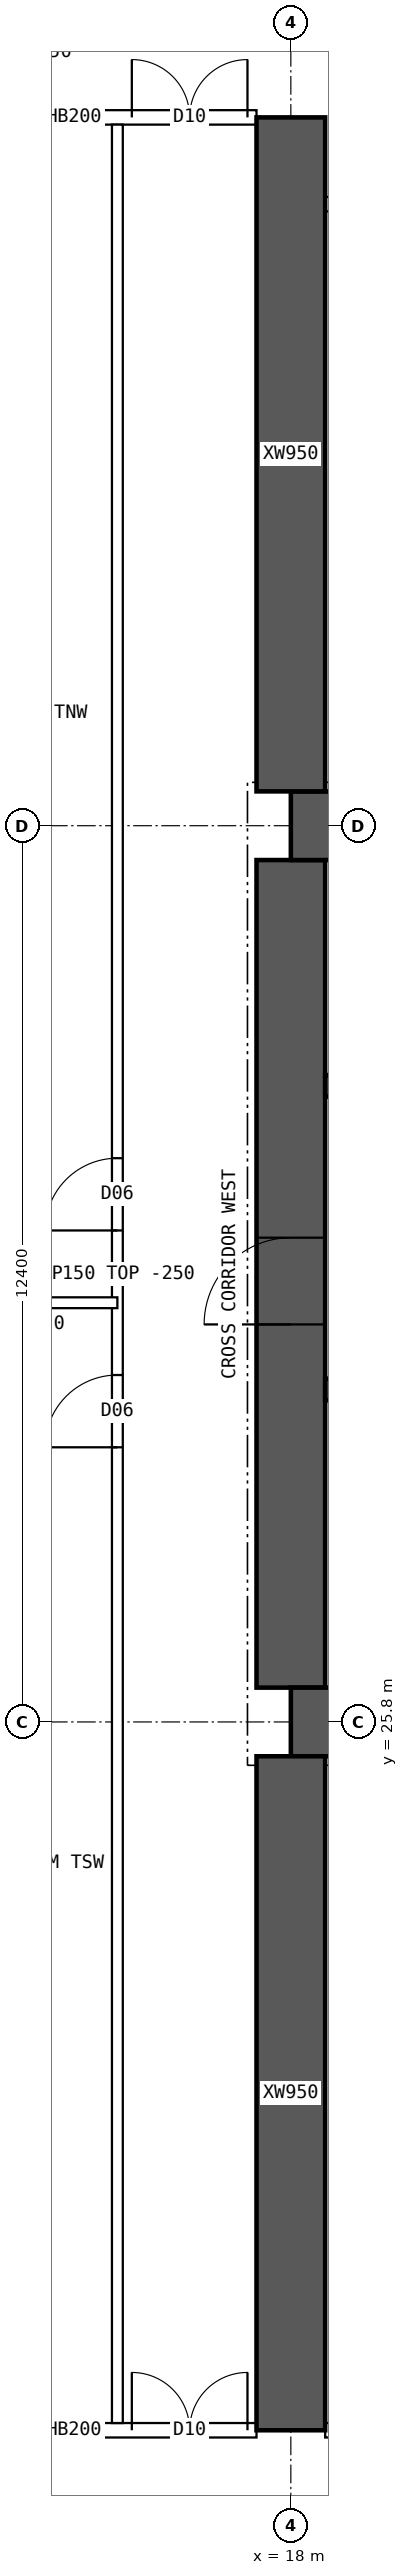
"""IFC4 building model, lengths in metres.
Left out: names, types, materials, properties, quantities, classifications, styles, units other than length and angle.
Written with IfcOpenShell. Run it as: python <this file> out.ifc"""

import sys

from ifc_helpers import new_model, si_unit, direction, frame, frame_2d, origin, place, context, subcontext, project, spatial, rectangle, extrude, element, fill, save


model = new_model("IFC4")
c1 = context("Model", 3, precision=1e-05, world=origin(), true_north=direction((0.0, 1.0)))
c2 = subcontext(c1, "Body", "Model", "MODEL_VIEW")
j1 = project(units=[si_unit("LENGTHUNIT", "METRE"), si_unit("PLANEANGLEUNIT", "RADIAN")], contexts=[c1])
p1 = place(None, origin())
s1 = spatial("IfcSite", under=j1, at=p1, CompositionType="ELEMENT")
p2 = place(p1, origin())
s2 = spatial("IfcBuilding", under=s1, at=p2, CompositionType="ELEMENT")
p3 = place(p2, frame((0.0, 0.0, 125.65)))
s3 = spatial("IfcBuildingStorey", under=s2, at=p3, CompositionType="ELEMENT", Elevation=125.65)
for number, where, z_axis, x_axis in (
    (1, (18.0, 25.8, 0.0), (0.0, 0.0, 1.0), (1.0, 0.0, 0.0)),
    (2, (18.0, 38.2, 0.0), (0.0, 0.0, 1.0), (1.0, 0.0, 0.0)),
):
    element("IfcWall", number, at=place(p3, frame(where, z_axis=z_axis, x_axis=x_axis)), inside=s3, PredefinedType="SHEAR", context=c2, shape_type="SweptSolid", body=[
        extrude(rectangle(XDim=48.0, YDim=0.95, at=frame_2d((24.0, 0.0))), origin(), (0.0, 0.0, 1.0), 3.75),
    ])
p4 = place(p3, frame((18.0, 26.275, 0.0), z_axis=(0.0, 0.0, 1.0), x_axis=(0.0, 1.0, 0.0)))
e3 = element("IfcWall", 3, at=p4, inside=s3, PredefinedType="SHEAR", context=c2, shape_type="SweptSolid", body=[
    extrude(rectangle(XDim=11.45, YDim=0.95, at=frame_2d((5.725, 0.0))), origin(), (0.0, 0.0, 1.0), 3.75),
])
p5 = place(p4, frame((5.025, 0.0, 0.0)))
e4 = element("IfcOpeningElement", 4, at=p5, cuts=e3, PredefinedType="OPENING", context=c2, shape_type="SweptSolid", body=[
    extrude(rectangle(XDim=1.2, YDim=2.1, at=frame_2d((0.6, 1.05))), frame((0.0, 0.485, 0.0), z_axis=(0.0, -1.0, 0.0), x_axis=(1.0, 0.0, 0.0)), (0.0, 0.0, 1.0), 0.97),
])
p6 = place(p3, frame((18.475, 30.4, 0.0), z_axis=(0.0, 0.0, 1.0), x_axis=(1.0, 0.0, 0.0)))
e5 = element("IfcWall", 5, at=p6, inside=s3, PredefinedType="SHEAR", context=c2, shape_type="SweptSolid", body=[
    extrude(rectangle(XDim=47.05, YDim=0.3, at=frame_2d((23.525, 0.0))), origin(), (0.0, 0.0, 1.0), 3.75),
])
p7 = place(p6, frame((0.4, 0.0, 0.0)))
e6 = element("IfcOpeningElement", 6, at=p7, cuts=e5, PredefinedType="OPENING", context=c2, shape_type="SweptSolid", body=[
    extrude(rectangle(XDim=1.0, YDim=2.1, at=frame_2d((0.5, 1.05))), frame((0.0, 0.16, 0.0), z_axis=(0.0, -1.0, 0.0), x_axis=(1.0, 0.0, 0.0)), (0.0, 0.0, 1.0), 0.32),
])
p8 = place(p6, frame((45.65, 0.0, 0.0)))
e7 = element("IfcOpeningElement", 7, at=p8, cuts=e5, PredefinedType="OPENING", context=c2, shape_type="SweptSolid", body=[
    extrude(rectangle(XDim=1.0, YDim=2.1, at=frame_2d((0.5, 1.05))), frame((0.0, 0.16, 0.0), z_axis=(0.0, -1.0, 0.0), x_axis=(1.0, 0.0, 0.0)), (0.0, 0.0, 1.0), 0.32),
])
p9 = place(p6, frame((8.275, 0.0, 0.0)))
e8 = element("IfcOpeningElement", 8, at=p9, cuts=e5, PredefinedType="OPENING", context=c2, shape_type="SweptSolid", body=[
    extrude(rectangle(XDim=1.1, YDim=2.1, at=frame_2d((0.55, 1.05))), frame((0.0, 0.16, 0.0), z_axis=(0.0, -1.0, 0.0), x_axis=(1.0, 0.0, 0.0)), (0.0, 0.0, 1.0), 0.32),
])
p10 = place(p6, frame((10.875, 0.0, 0.0)))
e9 = element("IfcOpeningElement", 9, at=p10, cuts=e5, PredefinedType="OPENING", context=c2, shape_type="SweptSolid", body=[
    extrude(rectangle(XDim=1.1, YDim=2.1, at=frame_2d((0.55, 1.05))), frame((0.0, 0.16, 0.0), z_axis=(0.0, -1.0, 0.0), x_axis=(1.0, 0.0, 0.0)), (0.0, 0.0, 1.0), 0.32),
])
p11 = place(p6, frame((13.475, 0.0, 0.0)))
e10 = element("IfcOpeningElement", 10, at=p11, cuts=e5, PredefinedType="OPENING", context=c2, shape_type="SweptSolid", body=[
    extrude(rectangle(XDim=1.1, YDim=2.1, at=frame_2d((0.55, 1.05))), frame((0.0, 0.16, 0.0), z_axis=(0.0, -1.0, 0.0), x_axis=(1.0, 0.0, 0.0)), (0.0, 0.0, 1.0), 0.32),
])
p12 = place(p6, frame((16.075, 0.0, 0.0)))
e11 = element("IfcOpeningElement", 11, at=p12, cuts=e5, PredefinedType="OPENING", context=c2, shape_type="SweptSolid", body=[
    extrude(rectangle(XDim=1.1, YDim=2.1, at=frame_2d((0.55, 1.05))), frame((0.0, 0.16, 0.0), z_axis=(0.0, -1.0, 0.0), x_axis=(1.0, 0.0, 0.0)), (0.0, 0.0, 1.0), 0.32),
])
p13 = place(p6, frame((18.85, 0.0, 0.0)))
e12 = element("IfcOpeningElement", 12, at=p13, cuts=e5, PredefinedType="OPENING", context=c2, shape_type="SweptSolid", body=[
    extrude(rectangle(XDim=0.9, YDim=2.1, at=frame_2d((0.45, 1.05))), frame((0.0, 0.16, 0.0), z_axis=(0.0, -1.0, 0.0), x_axis=(1.0, 0.0, 0.0)), (0.0, 0.0, 1.0), 0.32),
])
p14 = place(p6, frame((30.142, 0.0, 0.0)))
e13 = element("IfcOpeningElement", 13, at=p14, cuts=e5, PredefinedType="OPENING", context=c2, shape_type="SweptSolid", body=[
    extrude(rectangle(XDim=1.1, YDim=2.1, at=frame_2d((0.55, 1.05))), frame((0.0, 0.16, 0.0), z_axis=(0.0, -1.0, 0.0), x_axis=(1.0, 0.0, 0.0)), (0.0, 0.0, 1.0), 0.32),
])
p15 = place(p6, frame((33.675, 0.0, 0.0)))
e14 = element("IfcOpeningElement", 14, at=p15, cuts=e5, PredefinedType="OPENING", context=c2, shape_type="SweptSolid", body=[
    extrude(rectangle(XDim=1.1, YDim=2.1, at=frame_2d((0.55, 1.05))), frame((0.0, 0.16, 0.0), z_axis=(0.0, -1.0, 0.0), x_axis=(1.0, 0.0, 0.0)), (0.0, 0.0, 1.0), 0.32),
])
p16 = place(p6, frame((37.208, 0.0, 0.0)))
e15 = element("IfcOpeningElement", 15, at=p16, cuts=e5, PredefinedType="OPENING", context=c2, shape_type="SweptSolid", body=[
    extrude(rectangle(XDim=1.1, YDim=2.1, at=frame_2d((0.55, 1.05))), frame((0.0, 0.16, 0.0), z_axis=(0.0, -1.0, 0.0), x_axis=(1.0, 0.0, 0.0)), (0.0, 0.0, 1.0), 0.32),
])
p17 = place(p3, frame((18.475, 34.6, 0.0), z_axis=(0.0, 0.0, 1.0), x_axis=(1.0, 0.0, 0.0)))
e16 = element("IfcWall", 16, at=p17, inside=s3, PredefinedType="SHEAR", context=c2, shape_type="SweptSolid", body=[
    extrude(rectangle(XDim=47.05, YDim=0.3, at=frame_2d((23.525, 0.0))), origin(), (0.0, 0.0, 1.0), 3.75),
])
p18 = place(p17, frame((0.9, 0.0, 0.0)))
e17 = element("IfcOpeningElement", 17, at=p18, cuts=e16, PredefinedType="OPENING", context=c2, shape_type="SweptSolid", body=[
    extrude(rectangle(XDim=1.1, YDim=2.1, at=frame_2d((0.55, 1.05))), frame((0.0, 0.16, 0.0), z_axis=(0.0, -1.0, 0.0), x_axis=(1.0, 0.0, 0.0)), (0.0, 0.0, 1.0), 0.32),
])
p19 = place(p17, frame((45.05, 0.0, 0.0)))
e18 = element("IfcOpeningElement", 18, at=p19, cuts=e16, PredefinedType="OPENING", context=c2, shape_type="SweptSolid", body=[
    extrude(rectangle(XDim=1.1, YDim=2.1, at=frame_2d((0.55, 1.05))), frame((0.0, 0.16, 0.0), z_axis=(0.0, -1.0, 0.0), x_axis=(1.0, 0.0, 0.0)), (0.0, 0.0, 1.0), 0.32),
])
p20 = place(p17, frame((4.125, 0.0, 0.0)))
e19 = element("IfcOpeningElement", 19, at=p20, cuts=e16, PredefinedType="OPENING", context=c2, shape_type="SweptSolid", body=[
    extrude(rectangle(XDim=0.9, YDim=2.1, at=frame_2d((0.45, 1.05))), frame((0.0, 0.16, 0.0), z_axis=(0.0, -1.0, 0.0), x_axis=(1.0, 0.0, 0.0)), (0.0, 0.0, 1.0), 0.32),
])
p21 = place(p17, frame((42.025, 0.0, 0.0)))
e20 = element("IfcOpeningElement", 20, at=p21, cuts=e16, PredefinedType="OPENING", context=c2, shape_type="SweptSolid", body=[
    extrude(rectangle(XDim=0.9, YDim=2.1, at=frame_2d((0.45, 1.05))), frame((0.0, 0.16, 0.0), z_axis=(0.0, -1.0, 0.0), x_axis=(1.0, 0.0, 0.0)), (0.0, 0.0, 1.0), 0.32),
])
p22 = place(p17, frame((8.9, 0.0, 0.0)))
e21 = element("IfcOpeningElement", 21, at=p22, cuts=e16, PredefinedType="OPENING", context=c2, shape_type="SweptSolid", body=[
    extrude(rectangle(XDim=0.9, YDim=2.1, at=frame_2d((0.45, 1.05))), frame((0.0, 0.16, 0.0), z_axis=(0.0, -1.0, 0.0), x_axis=(1.0, 0.0, 0.0)), (0.0, 0.0, 1.0), 0.32),
])
p23 = place(p17, frame((12.874, 0.0, 0.0)))
e22 = element("IfcOpeningElement", 22, at=p23, cuts=e16, PredefinedType="OPENING", context=c2, shape_type="SweptSolid", body=[
    extrude(rectangle(XDim=0.9, YDim=2.1, at=frame_2d((0.45, 1.05))), frame((0.0, 0.16, 0.0), z_axis=(0.0, -1.0, 0.0), x_axis=(1.0, 0.0, 0.0)), (0.0, 0.0, 1.0), 0.32),
])
p24 = place(p17, frame((16.521, 0.0, 0.0)))
e23 = element("IfcOpeningElement", 23, at=p24, cuts=e16, PredefinedType="OPENING", context=c2, shape_type="SweptSolid", body=[
    extrude(rectangle(XDim=0.9, YDim=2.1, at=frame_2d((0.45, 1.05))), frame((0.0, 0.16, 0.0), z_axis=(0.0, -1.0, 0.0), x_axis=(1.0, 0.0, 0.0)), (0.0, 0.0, 1.0), 0.32),
])
p25 = place(p17, frame((20.28, 0.0, 0.0)))
e24 = element("IfcOpeningElement", 24, at=p25, cuts=e16, PredefinedType="OPENING", context=c2, shape_type="SweptSolid", body=[
    extrude(rectangle(XDim=0.9, YDim=2.1, at=frame_2d((0.45, 1.05))), frame((0.0, 0.16, 0.0), z_axis=(0.0, -1.0, 0.0), x_axis=(1.0, 0.0, 0.0)), (0.0, 0.0, 1.0), 0.32),
])
p26 = place(p17, frame((24.686, 0.0, 0.0)))
e25 = element("IfcOpeningElement", 25, at=p26, cuts=e16, PredefinedType="OPENING", context=c2, shape_type="SweptSolid", body=[
    extrude(rectangle(XDim=0.9, YDim=2.1, at=frame_2d((0.45, 1.05))), frame((0.0, 0.16, 0.0), z_axis=(0.0, -1.0, 0.0), x_axis=(1.0, 0.0, 0.0)), (0.0, 0.0, 1.0), 0.32),
])
p27 = place(p17, frame((27.483, 0.0, 0.0)))
e26 = element("IfcOpeningElement", 26, at=p27, cuts=e16, PredefinedType="OPENING", context=c2, shape_type="SweptSolid", body=[
    extrude(rectangle(XDim=0.9, YDim=2.1, at=frame_2d((0.45, 1.05))), frame((0.0, 0.16, 0.0), z_axis=(0.0, -1.0, 0.0), x_axis=(1.0, 0.0, 0.0)), (0.0, 0.0, 1.0), 0.32),
])
p28 = place(p17, frame((29.45, 0.0, 0.0)))
e27 = element("IfcOpeningElement", 27, at=p28, cuts=e16, PredefinedType="OPENING", context=c2, shape_type="SweptSolid", body=[
    extrude(rectangle(XDim=0.9, YDim=2.1, at=frame_2d((0.45, 1.05))), frame((0.0, 0.16, 0.0), z_axis=(0.0, -1.0, 0.0), x_axis=(1.0, 0.0, 0.0)), (0.0, 0.0, 1.0), 0.32),
])
p29 = place(p17, frame((31.882, 0.0, 0.0)))
e28 = element("IfcOpeningElement", 28, at=p29, cuts=e16, PredefinedType="OPENING", context=c2, shape_type="SweptSolid", body=[
    extrude(rectangle(XDim=0.9, YDim=2.1, at=frame_2d((0.45, 1.05))), frame((0.0, 0.16, 0.0), z_axis=(0.0, -1.0, 0.0), x_axis=(1.0, 0.0, 0.0)), (0.0, 0.0, 1.0), 0.32),
])
p30 = place(p17, frame((34.617, 0.0, 0.0)))
e29 = element("IfcOpeningElement", 29, at=p30, cuts=e16, PredefinedType="OPENING", context=c2, shape_type="SweptSolid", body=[
    extrude(rectangle(XDim=0.9, YDim=2.1, at=frame_2d((0.45, 1.05))), frame((0.0, 0.16, 0.0), z_axis=(0.0, -1.0, 0.0), x_axis=(1.0, 0.0, 0.0)), (0.0, 0.0, 1.0), 0.32),
])
p31 = place(p17, frame((37.656, 0.0, 0.0)))
e30 = element("IfcOpeningElement", 30, at=p31, cuts=e16, PredefinedType="OPENING", context=c2, shape_type="SweptSolid", body=[
    extrude(rectangle(XDim=0.9, YDim=2.1, at=frame_2d((0.45, 1.05))), frame((0.0, 0.16, 0.0), z_axis=(0.0, -1.0, 0.0), x_axis=(1.0, 0.0, 0.0)), (0.0, 0.0, 1.0), 0.32),
])
for number, where, z_axis, x_axis in (
    (31, (18.0, 16.0, 0.0), (0.0, 0.0, 1.0), (0.0, 1.0, 0.0)),
    (32, (18.0, 38.675, 0.0), (0.0, 0.0, 1.0), (0.0, 1.0, 0.0)),
):
    element("IfcWall", number, at=place(p3, frame(where, z_axis=z_axis, x_axis=x_axis)), inside=s3, PredefinedType="SHEAR", context=c2, shape_type="SweptSolid", body=[
        extrude(rectangle(XDim=9.325, YDim=0.95, at=frame_2d((4.663, 0.0))), origin(), (0.0, 0.0, 1.0), 3.75),
    ])
p32 = place(p3, frame((12.475, 16.0, 0.0), z_axis=(0.0, 0.0, 1.0), x_axis=(1.0, 0.0, 0.0)))
e33 = element("IfcWall", 33, at=p32, inside=s3, PredefinedType="SOLIDWALL", context=c2, shape_type="SweptSolid", body=[
    extrude(rectangle(XDim=5.05, YDim=0.2, at=frame_2d((2.525, 0.0))), origin(), (0.0, 0.0, 1.0), 3.5),
])
p33 = place(p32, frame((3.325, 0.0, 0.0)))
e34 = element("IfcOpeningElement", 34, at=p33, cuts=e33, PredefinedType="OPENING", context=c2, shape_type="SweptSolid", body=[
    extrude(rectangle(XDim=1.6, YDim=2.1, at=frame_2d((0.8, 1.05))), frame((0.0, 0.11, 0.0), z_axis=(0.0, -1.0, 0.0), x_axis=(1.0, 0.0, 0.0)), (0.0, 0.0, 1.0), 0.22),
])
p34 = place(p3, frame((18.475, 16.0, 0.0), z_axis=(0.0, 0.0, 1.0), x_axis=(1.0, 0.0, 0.0)))
e35 = element("IfcWall", 35, at=p34, inside=s3, PredefinedType="SOLIDWALL", context=c2, shape_type="SweptSolid", body=[
    extrude(rectangle(XDim=5.05, YDim=0.2, at=frame_2d((2.525, 0.0))), origin(), (0.0, 0.0, 1.0), 3.5),
])
p35 = place(p34, frame((0.35, 0.0, 0.0)))
e36 = element("IfcOpeningElement", 36, at=p35, cuts=e35, PredefinedType="OPENING", context=c2, shape_type="SweptSolid", body=[
    extrude(rectangle(XDim=0.9, YDim=2.1, at=frame_2d((0.45, 1.05))), frame((0.0, 0.11, 0.0), z_axis=(0.0, -1.0, 0.0), x_axis=(1.0, 0.0, 0.0)), (0.0, 0.0, 1.0), 0.22),
])
p36 = place(p34, frame((3.215, 0.0, 0.0)))
e37 = element("IfcOpeningElement", 37, at=p36, cuts=e35, PredefinedType="OPENING", context=c2, shape_type="SweptSolid", body=[
    extrude(rectangle(XDim=0.9, YDim=2.1, at=frame_2d((0.45, 1.05))), frame((0.0, 0.11, 0.0), z_axis=(0.0, -1.0, 0.0), x_axis=(1.0, 0.0, 0.0)), (0.0, 0.0, 1.0), 0.22),
])
p37 = place(p3, frame((12.475, 48.0, 0.0), z_axis=(0.0, 0.0, 1.0), x_axis=(1.0, 0.0, 0.0)))
e38 = element("IfcWall", 38, at=p37, inside=s3, PredefinedType="SOLIDWALL", context=c2, shape_type="SweptSolid", body=[
    extrude(rectangle(XDim=5.05, YDim=0.2, at=frame_2d((2.525, 0.0))), origin(), (0.0, 0.0, 1.0), 3.5),
])
p38 = place(p37, frame((3.325, 0.0, 0.0)))
e39 = element("IfcOpeningElement", 39, at=p38, cuts=e38, PredefinedType="OPENING", context=c2, shape_type="SweptSolid", body=[
    extrude(rectangle(XDim=1.6, YDim=2.1, at=frame_2d((0.8, 1.05))), frame((0.0, 0.11, 0.0), z_axis=(0.0, -1.0, 0.0), x_axis=(1.0, 0.0, 0.0)), (0.0, 0.0, 1.0), 0.22),
])
p39 = place(p3, frame((18.475, 46.8, 0.0), z_axis=(0.0, 0.0, 1.0), x_axis=(1.0, 0.0, 0.0)))
e40 = element("IfcWall", 40, at=p39, inside=s3, PredefinedType="SOLIDWALL", context=c2, shape_type="SweptSolid", body=[
    extrude(rectangle(XDim=5.05, YDim=0.2, at=frame_2d((2.525, 0.0))), origin(), (0.0, 0.0, 1.0), 3.5),
])
p40 = place(p39, frame((0.8, 0.0, 0.0)))
e41 = element("IfcOpeningElement", 41, at=p40, cuts=e40, PredefinedType="OPENING", context=c2, shape_type="SweptSolid", body=[
    extrude(rectangle(XDim=1.0, YDim=2.1, at=frame_2d((0.5, 1.05))), frame((0.0, 0.11, 0.0), z_axis=(0.0, -1.0, 0.0), x_axis=(1.0, 0.0, 0.0)), (0.0, 0.0, 1.0), 0.22),
])
p41 = place(p3, frame((15.6, 16.1, 0.0), z_axis=(0.0, 0.0, 1.0), x_axis=(0.0, 1.0, 0.0)))
e42 = element("IfcWall", 42, at=p41, inside=s3, PredefinedType="PARTITIONING", context=c2, shape_type="SweptSolid", body=[
    extrude(rectangle(XDim=31.8, YDim=0.15, at=frame_2d((15.9, 0.0))), origin(), (0.0, 0.0, 1.0), 3.5),
])
p42 = place(p41, frame((13.5, 0.0, 0.0)))
e43 = element("IfcOpeningElement", 43, at=p42, cuts=e42, PredefinedType="OPENING", context=c2, shape_type="SweptSolid", body=[
    extrude(rectangle(XDim=1.0, YDim=2.1, at=frame_2d((0.5, 1.05))), frame((0.0, 0.085, 0.0), z_axis=(0.0, -1.0, 0.0), x_axis=(1.0, 0.0, 0.0)), (0.0, 0.0, 1.0), 0.17),
])
p43 = place(p41, frame((16.5, 0.0, 0.0)))
e44 = element("IfcOpeningElement", 44, at=p43, cuts=e42, PredefinedType="OPENING", context=c2, shape_type="SweptSolid", body=[
    extrude(rectangle(XDim=1.0, YDim=2.1, at=frame_2d((0.5, 1.05))), frame((0.0, 0.085, 0.0), z_axis=(0.0, -1.0, 0.0), x_axis=(1.0, 0.0, 0.0)), (0.0, 0.0, 1.0), 0.17),
])
p44 = place(p3, frame((12.0, 31.6, 0.0), z_axis=(0.0, 0.0, 1.0), x_axis=(1.0, 0.0, 0.0)))
e45 = element("IfcWall", 45, at=p44, inside=s3, PredefinedType="PARTITIONING", context=c2, shape_type="SweptSolid", body=[
    extrude(rectangle(XDim=3.6, YDim=0.15, at=frame_2d((1.8, 0.0))), origin(), (0.0, 0.0, 1.0), 3.5),
])
p45 = place(p5, origin())
e46 = element("IfcDoor", 46, at=p45, inside=s3, OperationType="SINGLE_SWING_LEFT", PredefinedType="DOOR", context=c2, shape_type="SweptSolid", body=[
    extrude(rectangle(XDim=1.2, YDim=2.1, at=frame_2d((0.6, 1.05))), frame((0.0, 0.025, 0.0), z_axis=(0.0, -1.0, 0.0), x_axis=(1.0, 0.0, 0.0)), (0.0, 0.0, 1.0), 0.05),
])
fill(e4, e46)
p46 = place(p33, origin())
e47 = element("IfcDoor", 47, at=p46, inside=s3, OperationType="DOUBLE_DOOR_SINGLE_SWING", PredefinedType="DOOR", context=c2, shape_type="SweptSolid", body=[
    extrude(rectangle(XDim=1.6, YDim=2.1, at=frame_2d((0.8, 1.05))), frame((0.0, 0.025, 0.0), z_axis=(0.0, -1.0, 0.0), x_axis=(1.0, 0.0, 0.0)), (0.0, 0.0, 1.0), 0.05),
])
fill(e34, e47)
p47 = place(p38, origin())
e48 = element("IfcDoor", 48, at=p47, inside=s3, OperationType="DOUBLE_DOOR_SINGLE_SWING", PredefinedType="DOOR", context=c2, shape_type="SweptSolid", body=[
    extrude(rectangle(XDim=1.6, YDim=2.1, at=frame_2d((0.8, 1.05))), frame((0.0, 0.025, 0.0), z_axis=(0.0, -1.0, 0.0), x_axis=(1.0, 0.0, 0.0)), (0.0, 0.0, 1.0), 0.05),
])
fill(e39, e48)
p48 = place(p42, origin())
e49 = element("IfcDoor", 49, at=p48, inside=s3, OperationType="SINGLE_SWING_LEFT", PredefinedType="DOOR", context=c2, shape_type="SweptSolid", body=[
    extrude(rectangle(XDim=1.0, YDim=2.1, at=frame_2d((0.5, 1.05))), frame((0.0, 0.025, 0.0), z_axis=(0.0, -1.0, 0.0), x_axis=(1.0, 0.0, 0.0)), (0.0, 0.0, 1.0), 0.05),
])
fill(e43, e49)
p49 = place(p43, origin())
e50 = element("IfcDoor", 50, at=p49, inside=s3, OperationType="SINGLE_SWING_LEFT", PredefinedType="DOOR", context=c2, shape_type="SweptSolid", body=[
    extrude(rectangle(XDim=1.0, YDim=2.1, at=frame_2d((0.5, 1.05))), frame((0.0, 0.025, 0.0), z_axis=(0.0, -1.0, 0.0), x_axis=(1.0, 0.0, 0.0)), (0.0, 0.0, 1.0), 0.05),
])
fill(e44, e50)
save(model, sys.argv[1])
